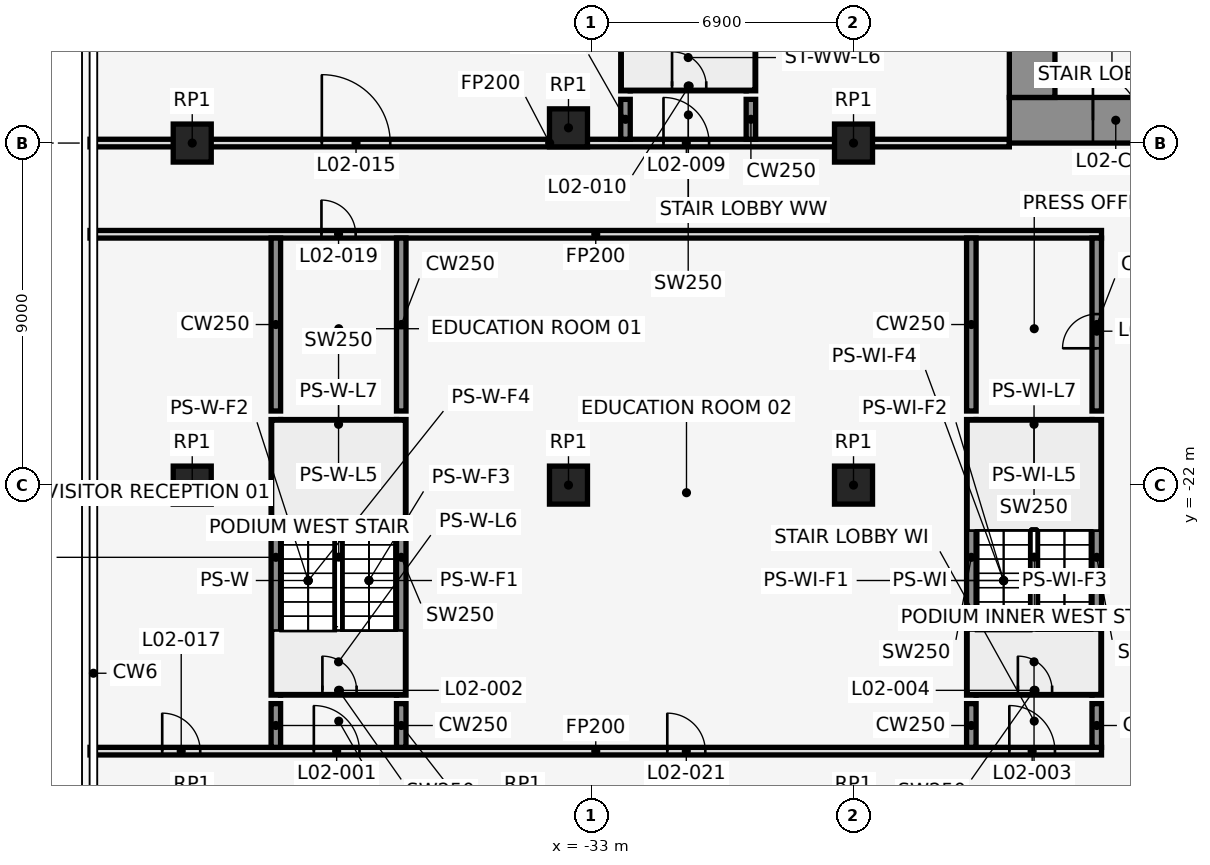
"""IFC4 building model, lengths in metres.
Left out: names, types, materials, properties, quantities, classifications, styles, units other than length and angle.
Written with IfcOpenShell. Run it as: python <this file> out.ifc"""

import sys

from ifc_helpers import new_model, si_unit, direction, frame, frame_2d, origin, origin_2d, place, context, subcontext, project, spatial, rectangle, extrude, element, fill, save


model = new_model("IFC4")
c1 = context("Model", 3, precision=1e-05, world=origin(), true_north=direction((0.0, 1.0)))
c2 = subcontext(c1, "Body", "Model", "MODEL_VIEW")
j1 = project(units=[si_unit("LENGTHUNIT", "METRE"), si_unit("PLANEANGLEUNIT", "RADIAN")], contexts=[c1])
p1 = place(None, origin())
s1 = spatial("IfcSite", under=j1, at=p1, CompositionType="ELEMENT")
p2 = place(p1, origin())
s2 = spatial("IfcBuilding", under=s1, at=p2, CompositionType="ELEMENT")
p3 = place(p2, frame((0.0, 0.0, 14.0)))
s3 = spatial("IfcBuildingStorey", under=s2, at=p3, CompositionType="ELEMENT", Elevation=14.0)
for number, where, z_axis, x_axis in (
    (1, (-33.6, -12.6, 0.0), (0.0, 0.0, 1.0), (1.0, 0.0, 0.0)),
    (2, (-33.6, -22.0, 0.0), (0.0, 0.0, 1.0), (1.0, 0.0, 0.0)),
    (3, (-26.1, -22.0, 0.0), (0.0, 0.0, 1.0), (1.0, 0.0, 0.0)),
    (4, (-43.5, -13.0, 0.0), (0.0, 0.0, 1.0), (1.0, 0.0, 0.0)),
    (5, (-43.5, -22.0, 0.0), (0.0, 0.0, 1.0), (1.0, 0.0, 0.0)),
    (6, (-26.1, -13.0, 0.0), (0.0, 0.0, 1.0), (1.0, 0.0, 0.0)),
):
    element("IfcColumn", number, at=place(p3, frame(where, z_axis=z_axis, x_axis=x_axis)), inside=s3, PredefinedType="COLUMN", context=c2, shape_type="SweptSolid", body=[
        extrude(rectangle(XDim=1.0, YDim=1.0, at=origin_2d()), origin(), (0.0, 0.0, 1.0), 6.0),
    ])
for number, where, z_axis, x_axis in (
    (7, (-32.1, -11.625, 0.0), (0.0, 0.0, 1.0), (0.0, 1.0, 0.0)),
    (8, (-28.8, -11.625, 0.0), (0.0, 0.0, 1.0), (0.0, 1.0, 0.0)),
):
    element("IfcWall", number, at=place(p3, frame(where, z_axis=z_axis, x_axis=x_axis)), inside=s3, PredefinedType="SHEAR", context=c2, shape_type="SweptSolid", body=[
        extrude(rectangle(XDim=7.25, YDim=0.25, at=frame_2d((3.625, 0.0))), origin(), (0.0, 0.0, 1.0), 6.0),
    ])
p4 = place(p3, frame((-31.975, -11.5, 0.0), z_axis=(0.0, 0.0, 1.0), x_axis=(1.0, 0.0, 0.0)))
e9 = element("IfcWall", 9, at=p4, inside=s3, PredefinedType="SHEAR", context=c2, shape_type="SweptSolid", body=[
    extrude(rectangle(XDim=3.05, YDim=0.25, at=frame_2d((1.525, 0.0))), origin(), (0.0, 0.0, 1.0), 6.0),
])
p5 = place(p4, frame((1.1, 0.0, 0.0)))
e10 = element("IfcOpeningElement", 10, at=p5, cuts=e9, PredefinedType="OPENING", context=c2, shape_type="SweptSolid", body=[
    extrude(rectangle(XDim=0.9, YDim=2.1, at=frame_2d((0.45, 1.05))), frame((0.0, 0.137, 0.0), z_axis=(0.0, -1.0, 0.0), x_axis=(1.0, 0.0, 0.0)), (0.0, 0.0, 1.0), 0.274),
])
for number, where, z_axis, x_axis in (
    (11, (-41.3, -27.525, 0.0), (0.0, 0.0, 1.0), (0.0, 1.0, 0.0)),
    (12, (-38.0, -27.525, 0.0), (0.0, 0.0, 1.0), (0.0, 1.0, 0.0)),
):
    element("IfcWall", number, at=place(p3, frame(where, z_axis=z_axis, x_axis=x_axis)), inside=s3, PredefinedType="SHEAR", context=c2, shape_type="SweptSolid", body=[
        extrude(rectangle(XDim=7.25, YDim=0.25, at=frame_2d((3.625, 0.0))), origin(), (0.0, 0.0, 1.0), 6.0),
    ])
p6 = place(p3, frame((-41.175, -27.4, 0.0), z_axis=(0.0, 0.0, 1.0), x_axis=(1.0, 0.0, 0.0)))
e13 = element("IfcWall", 13, at=p6, inside=s3, PredefinedType="SHEAR", context=c2, shape_type="SweptSolid", body=[
    extrude(rectangle(XDim=3.05, YDim=0.25, at=frame_2d((1.525, 0.0))), origin(), (0.0, 0.0, 1.0), 6.0),
])
p7 = place(p6, frame((1.1, 0.0, 0.0)))
e14 = element("IfcOpeningElement", 14, at=p7, cuts=e13, PredefinedType="OPENING", context=c2, shape_type="SweptSolid", body=[
    extrude(rectangle(XDim=0.9, YDim=2.1, at=frame_2d((0.45, 1.05))), frame((0.0, 0.137, 0.0), z_axis=(0.0, -1.0, 0.0), x_axis=(1.0, 0.0, 0.0)), (0.0, 0.0, 1.0), 0.274),
])
p8 = place(p3, frame((-41.175, -20.4, 0.0), z_axis=(0.0, 0.0, 1.0), x_axis=(1.0, 0.0, 0.0)))
e15 = element("IfcWall", 15, at=p8, inside=s3, PredefinedType="SHEAR", context=c2, shape_type="SweptSolid", body=[
    extrude(rectangle(XDim=3.05, YDim=0.25, at=frame_2d((1.525, 0.0))), origin(), (0.0, 0.0, 1.0), 6.0),
])
for number, where, z_axis, x_axis in (
    (16, (-23.0, -27.525, 0.0), (0.0, 0.0, 1.0), (0.0, 1.0, 0.0)),
    (17, (-19.7, -27.525, 0.0), (0.0, 0.0, 1.0), (0.0, 1.0, 0.0)),
):
    element("IfcWall", number, at=place(p3, frame(where, z_axis=z_axis, x_axis=x_axis)), inside=s3, PredefinedType="SHEAR", context=c2, shape_type="SweptSolid", body=[
        extrude(rectangle(XDim=7.25, YDim=0.25, at=frame_2d((3.625, 0.0))), origin(), (0.0, 0.0, 1.0), 6.0),
    ])
p9 = place(p3, frame((-22.875, -27.4, 0.0), z_axis=(0.0, 0.0, 1.0), x_axis=(1.0, 0.0, 0.0)))
e18 = element("IfcWall", 18, at=p9, inside=s3, PredefinedType="SHEAR", context=c2, shape_type="SweptSolid", body=[
    extrude(rectangle(XDim=3.05, YDim=0.25, at=frame_2d((1.525, 0.0))), origin(), (0.0, 0.0, 1.0), 6.0),
])
p10 = place(p9, frame((1.1, 0.0, 0.0)))
e19 = element("IfcOpeningElement", 19, at=p10, cuts=e18, PredefinedType="OPENING", context=c2, shape_type="SweptSolid", body=[
    extrude(rectangle(XDim=0.9, YDim=2.1, at=frame_2d((0.45, 1.05))), frame((0.0, 0.137, 0.0), z_axis=(0.0, -1.0, 0.0), x_axis=(1.0, 0.0, 0.0)), (0.0, 0.0, 1.0), 0.274),
])
p11 = place(p3, frame((-22.875, -20.4, 0.0), z_axis=(0.0, 0.0, 1.0), x_axis=(1.0, 0.0, 0.0)))
e20 = element("IfcWall", 20, at=p11, inside=s3, PredefinedType="SHEAR", context=c2, shape_type="SweptSolid", body=[
    extrude(rectangle(XDim=3.05, YDim=0.25, at=frame_2d((1.525, 0.0))), origin(), (0.0, 0.0, 1.0), 6.0),
])
p12 = place(p3, frame((-46.19, -29.0, 0.0), z_axis=(0.0, 0.0, 1.0), x_axis=(1.0, 0.0, 0.0)))
e21 = element("IfcWall", 21, at=p12, inside=s3, PredefinedType="PARTITIONING", context=c2, shape_type="SweptSolid", body=[
    extrude(rectangle(XDim=26.615, YDim=0.2, at=frame_2d((13.308, 0.0))), origin(), (0.0, 0.0, 1.0), 5.7),
])
p13 = place(p12, frame((5.89, 0.0, 0.0)))
e22 = element("IfcOpeningElement", 22, at=p13, cuts=e21, PredefinedType="OPENING", context=c2, shape_type="SweptSolid", body=[
    extrude(rectangle(XDim=1.2, YDim=2.1, at=frame_2d((0.6, 1.05))), frame((0.0, 0.112, 0.0), z_axis=(0.0, -1.0, 0.0), x_axis=(1.0, 0.0, 0.0)), (0.0, 0.0, 1.0), 0.224),
])
p14 = place(p12, frame((24.19, 0.0, 0.0)))
e23 = element("IfcOpeningElement", 23, at=p14, cuts=e21, PredefinedType="OPENING", context=c2, shape_type="SweptSolid", body=[
    extrude(rectangle(XDim=1.2, YDim=2.1, at=frame_2d((0.6, 1.05))), frame((0.0, 0.112, 0.0), z_axis=(0.0, -1.0, 0.0), x_axis=(1.0, 0.0, 0.0)), (0.0, 0.0, 1.0), 0.224),
])
p15 = place(p12, frame((1.9, 0.0, 0.0)))
e24 = element("IfcOpeningElement", 24, at=p15, cuts=e21, PredefinedType="OPENING", context=c2, shape_type="SweptSolid", body=[
    extrude(rectangle(XDim=1.0, YDim=2.1, at=frame_2d((0.5, 1.05))), frame((0.0, 0.112, 0.0), z_axis=(0.0, -1.0, 0.0), x_axis=(1.0, 0.0, 0.0)), (0.0, 0.0, 1.0), 0.224),
])
p16 = place(p12, frame((15.19, 0.0, 0.0)))
e25 = element("IfcOpeningElement", 25, at=p16, cuts=e21, PredefinedType="OPENING", context=c2, shape_type="SweptSolid", body=[
    extrude(rectangle(XDim=1.0, YDim=2.1, at=frame_2d((0.5, 1.05))), frame((0.0, 0.112, 0.0), z_axis=(0.0, -1.0, 0.0), x_axis=(1.0, 0.0, 0.0)), (0.0, 0.0, 1.0), 0.224),
])
p17 = place(p3, frame((-46.19, -15.4, 0.0), z_axis=(0.0, 0.0, 1.0), x_axis=(1.0, 0.0, 0.0)))
e26 = element("IfcWall", 26, at=p17, inside=s3, PredefinedType="PARTITIONING", context=c2, shape_type="SweptSolid", body=[
    extrude(rectangle(XDim=26.615, YDim=0.2, at=frame_2d((13.308, 0.0))), origin(), (0.0, 0.0, 1.0), 5.7),
])
p18 = place(p17, frame((6.09, 0.0, 0.0)))
e27 = element("IfcOpeningElement", 27, at=p18, cuts=e26, PredefinedType="OPENING", context=c2, shape_type="SweptSolid", body=[
    extrude(rectangle(XDim=0.9, YDim=2.1, at=frame_2d((0.45, 1.05))), frame((0.0, 0.112, 0.0), z_axis=(0.0, -1.0, 0.0), x_axis=(1.0, 0.0, 0.0)), (0.0, 0.0, 1.0), 0.224),
])
p19 = place(p3, frame((-46.19, -13.0, 0.0), z_axis=(0.0, 0.0, 1.0), x_axis=(1.0, 0.0, 0.0)))
e28 = element("IfcWall", 28, at=p19, inside=s3, PredefinedType="PARTITIONING", context=c2, shape_type="SweptSolid", body=[
    extrude(rectangle(XDim=24.19, YDim=0.2, at=frame_2d((12.095, 0.0))), origin(), (0.0, 0.0, 1.0), 5.7),
])
p20 = place(p19, frame((15.09, 0.0, 0.0)))
e29 = element("IfcOpeningElement", 29, at=p20, cuts=e28, PredefinedType="OPENING", context=c2, shape_type="SweptSolid", body=[
    extrude(rectangle(XDim=1.2, YDim=2.1, at=frame_2d((0.6, 1.05))), frame((0.0, 0.112, 0.0), z_axis=(0.0, -1.0, 0.0), x_axis=(1.0, 0.0, 0.0)), (0.0, 0.0, 1.0), 0.224),
])
p21 = place(p19, frame((6.1, 0.0, 0.0)))
e30 = element("IfcOpeningElement", 30, at=p21, cuts=e28, PredefinedType="OPENING", context=c2, shape_type="SweptSolid", body=[
    extrude(rectangle(XDim=1.8, YDim=2.1, at=frame_2d((0.9, 1.05))), frame((0.0, 0.112, 0.0), z_axis=(0.0, -1.0, 0.0), x_axis=(1.0, 0.0, 0.0)), (0.0, 0.0, 1.0), 0.224),
])
p22 = place(p3, frame((-41.3, -28.9, 0.0), z_axis=(0.0, 0.0, 1.0), x_axis=(0.0, 1.0, 0.0)))
e31 = element("IfcWall", 31, at=p22, inside=s3, PredefinedType="SHEAR", context=c2, shape_type="SweptSolid", body=[
    extrude(rectangle(XDim=1.15, YDim=0.25, at=frame_2d((0.575, 0.0))), origin(), (0.0, 0.0, 1.0), 6.0),
])
p23 = place(p3, frame((-41.3, -20.05, 0.0), z_axis=(0.0, 0.0, 1.0), x_axis=(0.0, 1.0, 0.0)))
e32 = element("IfcWall", 32, at=p23, inside=s3, PredefinedType="SHEAR", context=c2, shape_type="SweptSolid", body=[
    extrude(rectangle(XDim=4.55, YDim=0.25, at=frame_2d((2.275, 0.0))), origin(), (0.0, 0.0, 1.0), 6.0),
])
p24 = place(p3, frame((-38.0, -28.9, 0.0), z_axis=(0.0, 0.0, 1.0), x_axis=(0.0, 1.0, 0.0)))
e33 = element("IfcWall", 33, at=p24, inside=s3, PredefinedType="SHEAR", context=c2, shape_type="SweptSolid", body=[
    extrude(rectangle(XDim=1.15, YDim=0.25, at=frame_2d((0.575, 0.0))), origin(), (0.0, 0.0, 1.0), 6.0),
])
p25 = place(p3, frame((-38.0, -20.05, 0.0), z_axis=(0.0, 0.0, 1.0), x_axis=(0.0, 1.0, 0.0)))
e34 = element("IfcWall", 34, at=p25, inside=s3, PredefinedType="SHEAR", context=c2, shape_type="SweptSolid", body=[
    extrude(rectangle(XDim=4.55, YDim=0.25, at=frame_2d((2.275, 0.0))), origin(), (0.0, 0.0, 1.0), 6.0),
])
for number, where, z_axis, x_axis in (
    (35, (-32.1, -12.9, 0.0), (0.0, 0.0, 1.0), (0.0, 1.0, 0.0)),
    (36, (-28.8, -12.9, 0.0), (0.0, 0.0, 1.0), (0.0, 1.0, 0.0)),
):
    element("IfcWall", number, at=place(p3, frame(where, z_axis=z_axis, x_axis=x_axis)), inside=s3, PredefinedType="SHEAR", context=c2, shape_type="SweptSolid", body=[
        extrude(rectangle(XDim=1.05, YDim=0.25, at=frame_2d((0.525, 0.0))), origin(), (0.0, 0.0, 1.0), 6.0),
    ])
p26 = place(p3, frame((-23.0, -28.9, 0.0), z_axis=(0.0, 0.0, 1.0), x_axis=(0.0, 1.0, 0.0)))
e37 = element("IfcWall", 37, at=p26, inside=s3, PredefinedType="SHEAR", context=c2, shape_type="SweptSolid", body=[
    extrude(rectangle(XDim=1.15, YDim=0.25, at=frame_2d((0.575, 0.0))), origin(), (0.0, 0.0, 1.0), 6.0),
])
p27 = place(p3, frame((-23.0, -20.05, 0.0), z_axis=(0.0, 0.0, 1.0), x_axis=(0.0, 1.0, 0.0)))
e38 = element("IfcWall", 38, at=p27, inside=s3, PredefinedType="SHEAR", context=c2, shape_type="SweptSolid", body=[
    extrude(rectangle(XDim=4.55, YDim=0.25, at=frame_2d((2.275, 0.0))), origin(), (0.0, 0.0, 1.0), 6.0),
])
p28 = place(p3, frame((-19.7, -28.9, 0.0), z_axis=(0.0, 0.0, 1.0), x_axis=(0.0, 1.0, 0.0)))
e39 = element("IfcWall", 39, at=p28, inside=s3, PredefinedType="SHEAR", context=c2, shape_type="SweptSolid", body=[
    extrude(rectangle(XDim=1.15, YDim=0.25, at=frame_2d((0.575, 0.0))), origin(), (0.0, 0.0, 1.0), 6.0),
])
p29 = place(p3, frame((-19.7, -20.05, 0.0), z_axis=(0.0, 0.0, 1.0), x_axis=(0.0, 1.0, 0.0)))
e40 = element("IfcWall", 40, at=p29, inside=s3, PredefinedType="SHEAR", context=c2, shape_type="SweptSolid", body=[
    extrude(rectangle(XDim=4.55, YDim=0.25, at=frame_2d((2.275, 0.0))), origin(), (0.0, 0.0, 1.0), 6.0),
])
p30 = place(p29, frame((1.65, 0.0, 0.0)))
e41 = element("IfcOpeningElement", 41, at=p30, cuts=e40, PredefinedType="OPENING", context=c2, shape_type="SweptSolid", body=[
    extrude(rectangle(XDim=0.9, YDim=2.1, at=frame_2d((0.45, 1.05))), frame((0.0, 0.137, 0.0), z_axis=(0.0, -1.0, 0.0), x_axis=(1.0, 0.0, 0.0)), (0.0, 0.0, 1.0), 0.274),
])
p31 = place(p3, frame((-22.0, -12.4, 0.0), z_axis=(0.0, 0.0, 1.0), x_axis=(1.0, 0.0, 0.0)))
e42 = element("IfcWall", 42, at=p31, inside=s3, PredefinedType="SHEAR", context=c2, shape_type="SweptSolid", body=[
    extrude(rectangle(XDim=44.0, YDim=1.2, at=frame_2d((22.0, 0.0))), origin(), (0.0, 0.0, 1.0), 6.0),
])
p32 = place(p31, frame((2.2, 0.0, 0.0)))
e43 = element("IfcOpeningElement", 43, at=p32, cuts=e42, PredefinedType="OPENING", context=c2, shape_type="SweptSolid", body=[
    extrude(rectangle(XDim=1.2, YDim=2.1, at=frame_2d((0.6, 1.05))), frame((0.0, 0.612, 0.0), z_axis=(0.0, -1.0, 0.0), x_axis=(1.0, 0.0, 0.0)), (0.0, 0.0, 1.0), 1.224),
])
p33 = place(p31, frame((21.4, 0.0, 0.0)))
e44 = element("IfcOpeningElement", 44, at=p33, cuts=e42, PredefinedType="OPENING", context=c2, shape_type="SweptSolid", body=[
    extrude(rectangle(XDim=1.2, YDim=2.1, at=frame_2d((0.6, 1.05))), frame((0.0, 0.612, 0.0), z_axis=(0.0, -1.0, 0.0), x_axis=(1.0, 0.0, 0.0)), (0.0, 0.0, 1.0), 1.224),
])
p34 = place(p31, frame((40.6, 0.0, 0.0)))
e45 = element("IfcOpeningElement", 45, at=p34, cuts=e42, PredefinedType="OPENING", context=c2, shape_type="SweptSolid", body=[
    extrude(rectangle(XDim=1.2, YDim=2.1, at=frame_2d((0.6, 1.05))), frame((0.0, 0.612, 0.0), z_axis=(0.0, -1.0, 0.0), x_axis=(1.0, 0.0, 0.0)), (0.0, 0.0, 1.0), 1.224),
])
p35 = place(p31, frame((16.0, 0.0, 0.0)))
e46 = element("IfcOpeningElement", 46, at=p35, cuts=e42, PredefinedType="OPENING", context=c2, shape_type="SweptSolid", body=[
    extrude(rectangle(XDim=1.8, YDim=2.1, at=frame_2d((0.9, 1.05))), frame((0.0, 0.612, 0.0), z_axis=(0.0, -1.0, 0.0), x_axis=(1.0, 0.0, 0.0)), (0.0, 0.0, 1.0), 1.224),
])
p36 = place(p31, frame((6.3, 0.0, 0.0)))
e47 = element("IfcOpeningElement", 47, at=p36, cuts=e42, PredefinedType="OPENING", context=c2, shape_type="SweptSolid", body=[
    extrude(rectangle(XDim=1.2, YDim=2.1, at=frame_2d((0.6, 1.05))), frame((0.0, 0.612, 0.0), z_axis=(0.0, -1.0, 0.0), x_axis=(1.0, 0.0, 0.0)), (0.0, 0.0, 1.0), 1.224),
])
p37 = place(p31, frame((26.2, 0.0, 0.0)))
e48 = element("IfcOpeningElement", 48, at=p37, cuts=e42, PredefinedType="OPENING", context=c2, shape_type="SweptSolid", body=[
    extrude(rectangle(XDim=1.8, YDim=2.1, at=frame_2d((0.9, 1.05))), frame((0.0, 0.612, 0.0), z_axis=(0.0, -1.0, 0.0), x_axis=(1.0, 0.0, 0.0)), (0.0, 0.0, 1.0), 1.224),
])
p38 = place(p31, frame((36.5, 0.0, 0.0)))
e49 = element("IfcOpeningElement", 49, at=p38, cuts=e42, PredefinedType="OPENING", context=c2, shape_type="SweptSolid", body=[
    extrude(rectangle(XDim=1.2, YDim=2.1, at=frame_2d((0.6, 1.05))), frame((0.0, 0.612, 0.0), z_axis=(0.0, -1.0, 0.0), x_axis=(1.0, 0.0, 0.0)), (0.0, 0.0, 1.0), 1.224),
])
p39 = place(p3, frame((-21.4, -11.8, 0.0), z_axis=(0.0, 0.0, 1.0), x_axis=(0.0, 1.0, 0.0)))
e50 = element("IfcWall", 50, at=p39, inside=s3, PredefinedType="SHEAR", context=c2, shape_type="SweptSolid", body=[
    extrude(rectangle(XDim=10.6, YDim=1.2, at=frame_2d((5.3, 0.0))), origin(), (0.0, 0.0, 1.0), 6.0),
])
p40 = place(p13, origin())
e51 = element("IfcDoor", 51, at=p40, inside=s3, OperationType="SINGLE_SWING_LEFT", PredefinedType="DOOR", context=c2, shape_type="SweptSolid", body=[
    extrude(rectangle(XDim=1.2, YDim=2.1, at=frame_2d((0.6, 1.05))), frame((0.0, 0.025, 0.0), z_axis=(0.0, -1.0, 0.0), x_axis=(1.0, 0.0, 0.0)), (0.0, 0.0, 1.0), 0.05),
])
fill(e22, e51)
p41 = place(p7, origin())
e52 = element("IfcDoor", 52, at=p41, inside=s3, OperationType="SINGLE_SWING_LEFT", PredefinedType="DOOR", context=c2, shape_type="SweptSolid", body=[
    extrude(rectangle(XDim=0.9, YDim=2.1, at=frame_2d((0.45, 1.05))), frame((0.0, 0.025, 0.0), z_axis=(0.0, -1.0, 0.0), x_axis=(1.0, 0.0, 0.0)), (0.0, 0.0, 1.0), 0.05),
])
fill(e14, e52)
p42 = place(p14, origin())
e53 = element("IfcDoor", 53, at=p42, inside=s3, OperationType="SINGLE_SWING_RIGHT", PredefinedType="DOOR", context=c2, shape_type="SweptSolid", body=[
    extrude(rectangle(XDim=1.2, YDim=2.1, at=frame_2d((0.6, 1.05))), frame((0.0, 0.025, 0.0), z_axis=(0.0, -1.0, 0.0), x_axis=(1.0, 0.0, 0.0)), (0.0, 0.0, 1.0), 0.05),
])
fill(e23, e53)
p43 = place(p10, origin())
e54 = element("IfcDoor", 54, at=p43, inside=s3, OperationType="SINGLE_SWING_LEFT", PredefinedType="DOOR", context=c2, shape_type="SweptSolid", body=[
    extrude(rectangle(XDim=0.9, YDim=2.1, at=frame_2d((0.45, 1.05))), frame((0.0, 0.025, 0.0), z_axis=(0.0, -1.0, 0.0), x_axis=(1.0, 0.0, 0.0)), (0.0, 0.0, 1.0), 0.05),
])
fill(e19, e54)
p44 = place(p20, origin())
e55 = element("IfcDoor", 55, at=p44, inside=s3, OperationType="SINGLE_SWING_RIGHT", PredefinedType="DOOR", context=c2, shape_type="SweptSolid", body=[
    extrude(rectangle(XDim=1.2, YDim=2.1, at=frame_2d((0.6, 1.05))), frame((0.0, 0.025, 0.0), z_axis=(0.0, -1.0, 0.0), x_axis=(1.0, 0.0, 0.0)), (0.0, 0.0, 1.0), 0.05),
])
fill(e29, e55)
p45 = place(p5, origin())
e56 = element("IfcDoor", 56, at=p45, inside=s3, OperationType="SINGLE_SWING_LEFT", PredefinedType="DOOR", context=c2, shape_type="SweptSolid", body=[
    extrude(rectangle(XDim=0.9, YDim=2.1, at=frame_2d((0.45, 1.05))), frame((0.0, 0.025, 0.0), z_axis=(0.0, -1.0, 0.0), x_axis=(1.0, 0.0, 0.0)), (0.0, 0.0, 1.0), 0.05),
])
fill(e10, e56)
p46 = place(p21, origin())
e57 = element("IfcDoor", 57, at=p46, inside=s3, OperationType="SINGLE_SWING_LEFT", PredefinedType="DOOR", context=c2, shape_type="SweptSolid", body=[
    extrude(rectangle(XDim=1.8, YDim=2.1, at=frame_2d((0.9, 1.05))), frame((0.0, 0.025, 0.0), z_axis=(0.0, -1.0, 0.0), x_axis=(1.0, 0.0, 0.0)), (0.0, 0.0, 1.0), 0.05),
])
fill(e30, e57)
p47 = place(p15, origin())
e58 = element("IfcDoor", 58, at=p47, inside=s3, OperationType="SINGLE_SWING_LEFT", PredefinedType="DOOR", context=c2, shape_type="SweptSolid", body=[
    extrude(rectangle(XDim=1.0, YDim=2.1, at=frame_2d((0.5, 1.05))), frame((0.0, 0.025, 0.0), z_axis=(0.0, -1.0, 0.0), x_axis=(1.0, 0.0, 0.0)), (0.0, 0.0, 1.0), 0.05),
])
fill(e24, e58)
p48 = place(p18, frame((0.9, 0.0, 0.0), z_axis=(0.0, 0.0, 1.0), x_axis=(-1.0, 0.0, 0.0)))
e59 = element("IfcDoor", 59, at=p48, inside=s3, OperationType="SINGLE_SWING_LEFT", PredefinedType="DOOR", context=c2, shape_type="SweptSolid", body=[
    extrude(rectangle(XDim=0.9, YDim=2.1, at=frame_2d((0.45, 1.05))), frame((0.0, 0.025, 0.0), z_axis=(0.0, -1.0, 0.0), x_axis=(1.0, 0.0, 0.0)), (0.0, 0.0, 1.0), 0.05),
])
fill(e27, e59)
p49 = place(p16, origin())
e60 = element("IfcDoor", 60, at=p49, inside=s3, OperationType="SINGLE_SWING_RIGHT", PredefinedType="DOOR", context=c2, shape_type="SweptSolid", body=[
    extrude(rectangle(XDim=1.0, YDim=2.1, at=frame_2d((0.5, 1.05))), frame((0.0, 0.025, 0.0), z_axis=(0.0, -1.0, 0.0), x_axis=(1.0, 0.0, 0.0)), (0.0, 0.0, 1.0), 0.05),
])
fill(e25, e60)
p50 = place(p30, origin())
e61 = element("IfcDoor", 61, at=p50, inside=s3, OperationType="SINGLE_SWING_LEFT", PredefinedType="DOOR", context=c2, shape_type="SweptSolid", body=[
    extrude(rectangle(XDim=0.9, YDim=2.1, at=frame_2d((0.45, 1.05))), frame((0.0, 0.025, 0.0), z_axis=(0.0, -1.0, 0.0), x_axis=(1.0, 0.0, 0.0)), (0.0, 0.0, 1.0), 0.05),
])
fill(e41, e61)
p51 = place(p32, frame((1.2, 0.0, 0.0), z_axis=(0.0, 0.0, 1.0), x_axis=(-1.0, 0.0, 0.0)))
e62 = element("IfcDoor", 62, at=p51, inside=s3, OperationType="SINGLE_SWING_RIGHT", PredefinedType="DOOR", context=c2, shape_type="SweptSolid", body=[
    extrude(rectangle(XDim=1.2, YDim=2.1, at=frame_2d((0.6, 1.05))), frame((0.0, 0.025, 0.0), z_axis=(0.0, -1.0, 0.0), x_axis=(1.0, 0.0, 0.0)), (0.0, 0.0, 1.0), 0.05),
])
fill(e43, e62)
save(model, sys.argv[1])
